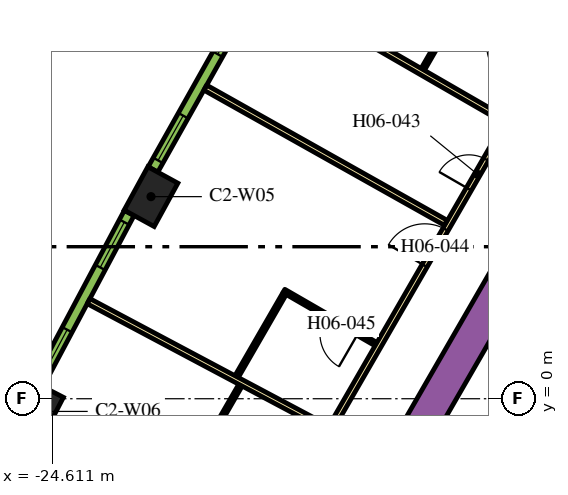
"""IFC4 building model, lengths in metres.
Left out: names, types, materials, properties, quantities, classifications, styles, units other than length and angle.
Written with IfcOpenShell. Run it as: python <this file> out.ifc"""

import sys

from ifc_helpers import new_model, si_unit, direction, frame, frame_2d, origin, origin_2d, place, context, subcontext, project, spatial, rectangle, extrude, element, fill, save


model = new_model("IFC4")
c1 = context("Model", 3, precision=1e-05, world=origin(), true_north=direction((0.0, 1.0)))
c2 = subcontext(c1, "Body", "Model", "MODEL_VIEW")
j1 = project(units=[si_unit("LENGTHUNIT", "METRE"), si_unit("PLANEANGLEUNIT", "RADIAN")], contexts=[c1])
p1 = place(None, origin())
s1 = spatial("IfcSite", under=j1, at=p1, CompositionType="ELEMENT")
p2 = place(p1, origin())
s2 = spatial("IfcBuilding", under=s1, at=p2, CompositionType="ELEMENT")
p3 = place(p2, frame((0.0, 0.0, 87.6)))
s3 = spatial("IfcBuildingStorey", under=s2, at=p3, CompositionType="ELEMENT", Elevation=87.6)
for number, where, z_axis, x_axis in (
    (1, (-22.009, 5.317, 0.0), (0.0, 0.0, 1.0), (-0.48, -0.877, 0.0)),
    (2, (-25.012, -0.334, 0.0), (0.0, 0.0, 1.0), (-0.459, -0.888, 0.0)),
):
    element("IfcColumn", number, at=place(p3, frame(where, z_axis=z_axis, x_axis=x_axis)), inside=s3, PredefinedType="COLUMN", context=c2, shape_type="SweptSolid", body=[
        extrude(rectangle(XDim=1.3, YDim=0.9, at=origin_2d()), origin(), (0.0, 0.0, 1.0), 3.9),
    ])
p4 = place(p3, frame((-15.36, -1.503, 0.0), z_axis=(0.0, 0.0, 1.0), x_axis=(0.50000389221, 0.866023156604, 0.0)))
e3 = element("IfcWall", 3, at=p4, inside=s3, PredefinedType="SOLIDWALL", context=c2, shape_type="SweptSolid", body=[
    extrude(rectangle(XDim=21.0, YDim=0.9, at=frame_2d((10.5, 0.0))), origin(), (0.0, 0.0, 1.0), 3.9),
])
p5 = place(p3, frame((-19.081, -3.9, 0.0), z_axis=(0.0, 0.0, 1.0), x_axis=(0.499998313975, 0.866026377209, 0.0)))
e4 = element("IfcWall", 4, at=p5, inside=s3, PredefinedType="PARTITIONING", context=c2, shape_type="SweptSolid", body=[
    extrude(rectangle(XDim=25.766, YDim=0.15, at=frame_2d((12.883, 0.0))), origin(), (0.0, 0.0, 1.0), 2.75),
])
p6 = place(p5, frame((19.306, 0.0, 0.0)))
e5 = element("IfcOpeningElement", 5, at=p6, cuts=e4, PredefinedType="OPENING", context=c2, shape_type="SweptSolid", body=[
    extrude(rectangle(XDim=1.0, YDim=2.1, at=frame_2d((0.5, 1.05))), frame((0.0, 0.085, 0.0), z_axis=(0.0, -1.0, 0.0), x_axis=(1.0, 0.0, 0.0)), (0.0, 0.0, 1.0), 0.17),
])
p7 = place(p5, frame((18.0, 0.0, 0.0)))
e6 = element("IfcOpeningElement", 6, at=p7, cuts=e4, PredefinedType="OPENING", context=c2, shape_type="SweptSolid", body=[
    extrude(rectangle(XDim=1.0, YDim=2.1, at=frame_2d((0.5, 1.05))), frame((0.0, 0.085, 0.0), z_axis=(0.0, -1.0, 0.0), x_axis=(1.0, 0.0, 0.0)), (0.0, 0.0, 1.0), 0.17),
])
p8 = place(p5, frame((10.874, 0.0, 0.0)))
e7 = element("IfcOpeningElement", 7, at=p8, cuts=e4, PredefinedType="OPENING", context=c2, shape_type="SweptSolid", body=[
    extrude(rectangle(XDim=0.9, YDim=2.1, at=frame_2d((0.45, 1.05))), frame((0.0, 0.085, 0.0), z_axis=(0.0, -1.0, 0.0), x_axis=(1.0, 0.0, 0.0)), (0.0, 0.0, 1.0), 0.17),
])
p9 = place(p5, frame((8.548, 0.0, 0.0)))
e8 = element("IfcOpeningElement", 8, at=p9, cuts=e4, PredefinedType="OPENING", context=c2, shape_type="SweptSolid", body=[
    extrude(rectangle(XDim=1.1, YDim=2.1, at=frame_2d((0.55, 1.05))), frame((0.0, 0.085, 0.0), z_axis=(0.0, -1.0, 0.0), x_axis=(1.0, 0.0, 0.0)), (0.0, 0.0, 1.0), 0.17),
])
p10 = place(p5, frame((0.18, 0.0, 0.0)))
e9 = element("IfcOpeningElement", 9, at=p10, cuts=e4, PredefinedType="OPENING", context=c2, shape_type="SweptSolid", body=[
    extrude(rectangle(XDim=1.0, YDim=2.1, at=frame_2d((0.5, 1.05))), frame((0.0, 0.085, 0.0), z_axis=(0.0, -1.0, 0.0), x_axis=(1.0, 0.0, 0.0)), (0.0, 0.0, 1.0), 0.17),
])
p11 = place(p3, frame((-23.652, 2.567, 0.0), z_axis=(0.0, 0.0, 1.0), x_axis=(0.883019237957, -0.469336793144, 0.0)))
e10 = element("IfcWall", 10, at=p11, inside=s3, PredefinedType="PARTITIONING", context=c2, shape_type="SweptSolid", body=[
    extrude(rectangle(XDim=7.111, YDim=0.15, at=frame_2d((3.555, 0.0))), origin(), (0.0, 0.0, 1.0), 2.75),
])
p12 = place(p3, frame((-20.581, 8.185, 0.0), z_axis=(0.0, 0.0, 1.0), x_axis=(0.871820720803, -0.489825102233, 0.0)))
e11 = element("IfcWall", 11, at=p12, inside=s3, PredefinedType="PARTITIONING", context=c2, shape_type="SweptSolid", body=[
    extrude(rectangle(XDim=7.257, YDim=0.15, at=frame_2d((3.628, 0.0))), origin(), (0.0, 0.0, 1.0), 2.75),
])
p13 = place(p3, frame((-18.484, 10.672, 0.0), z_axis=(0.0, 0.0, 1.0), x_axis=(0.866019162053, -0.50001081084, 0.0)))
e12 = element("IfcWall", 12, at=p13, inside=s3, PredefinedType="PARTITIONING", context=c2, shape_type="SweptSolid", body=[
    extrude(rectangle(XDim=6.694, YDim=0.15, at=frame_2d((3.347, 0.0))), origin(), (0.0, 0.0, 1.0), 2.75),
])
p14 = place(p3, frame((-11.75, 8.949, 0.0), z_axis=(0.0, 0.0, 1.0), x_axis=(-0.865997922154, 0.500047596559, 0.0)))
e13 = element("IfcWall", 13, at=p14, inside=s3, PredefinedType="PARTITIONING", context=c2, shape_type="SweptSolid", body=[
    extrude(rectangle(XDim=2.6, YDim=0.1, at=frame_2d((1.3, 0.0))), origin(), (0.0, 0.0, 1.0), 2.75),
])
p15 = place(p14, frame((0.6, 0.0, 0.0)))
e14 = element("IfcOpeningElement", 14, at=p15, cuts=e13, PredefinedType="OPENING", context=c2, shape_type="SweptSolid", body=[
    extrude(rectangle(XDim=0.9, YDim=2.1, at=frame_2d((0.45, 1.05))), frame((0.0, 0.06, 0.0), z_axis=(0.0, -1.0, 0.0), x_axis=(1.0, 0.0, 0.0)), (0.0, 0.0, 1.0), 0.12),
])
p16 = place(p3, frame((-13.983, 10.181, 0.0), z_axis=(0.0, 0.0, 1.0), x_axis=(-0.499980071345, -0.866036909293, 0.0)))
e15 = element("IfcWall", 15, at=p16, inside=s3, PredefinedType="PARTITIONING", context=c2, shape_type="SweptSolid", body=[
    extrude(rectangle(XDim=1.75, YDim=0.1, at=frame_2d((0.875, 0.0))), origin(), (0.0, 0.0, 1.0), 2.75),
])
p17 = place(p3, frame((-16.087, 1.436, 0.0), z_axis=(0.0, 0.0, 1.0), x_axis=(-0.866034573852, 0.49998411664, 0.0)))
e16 = element("IfcWall", 16, at=p17, inside=s3, PredefinedType="PARTITIONING", context=c2, shape_type="SweptSolid", body=[
    extrude(rectangle(XDim=2.8, YDim=0.1, at=frame_2d((1.4, 0.0))), origin(), (0.0, 0.0, 1.0), 2.75),
])
p18 = place(p17, frame((0.55, 0.0, 0.0)))
e17 = element("IfcOpeningElement", 17, at=p18, cuts=e16, PredefinedType="OPENING", context=c2, shape_type="SweptSolid", body=[
    extrude(rectangle(XDim=1.0, YDim=2.1, at=frame_2d((0.5, 1.05))), frame((0.0, 0.06, 0.0), z_axis=(0.0, -1.0, 0.0), x_axis=(1.0, 0.0, 0.0)), (0.0, 0.0, 1.0), 0.12),
])
p19 = place(p3, frame((-18.494, 2.768, 0.0), z_axis=(0.0, 0.0, 1.0), x_axis=(-0.500004791531, -0.866022637375, 0.0)))
e18 = element("IfcWall", 18, at=p19, inside=s3, PredefinedType="PARTITIONING", context=c2, shape_type="SweptSolid", body=[
    extrude(rectangle(XDim=2.52, YDim=0.1, at=frame_2d((1.26, 0.0))), origin(), (0.0, 0.0, 1.0), 2.75),
])
p20 = place(p3, frame((-20.449, -1.019, 0.0), z_axis=(0.0, 0.0, 1.0), x_axis=(0.500061319399, 0.865989998118, 0.0)))
e19 = element("IfcWall", 19, at=p20, inside=s3, PredefinedType="PARTITIONING", context=c2, shape_type="SweptSolid", body=[
    extrude(rectangle(XDim=1.58, YDim=0.1, at=frame_2d((0.79, 0.0))), origin(), (0.0, 0.0, 1.0), 2.75),
])
p21 = place(p3, frame((-19.458, 10.48, 0.0), z_axis=(0.0, 0.0, 1.0), x_axis=(-0.48983164787, -0.87181704316, 0.0)))
e20 = element("IfcWall", 20, at=p21, inside=s3, PredefinedType="SOLIDWALL", context=c2, shape_type="SweptSolid", body=[
    extrude(rectangle(XDim=5.1, YDim=0.29, at=frame_2d((2.55, 0.0))), origin(), (0.0, 0.0, 1.0), 3.65),
])
p22 = place(p21, frame((0.272, 0.0, 0.9)))
e21 = element("IfcOpeningElement", 21, at=p22, cuts=e20, PredefinedType="OPENING", context=c2, shape_type="SweptSolid", body=[
    extrude(rectangle(XDim=1.35, YDim=2.15, at=frame_2d((0.675, 1.075))), frame((0.0, 0.155, 0.0), z_axis=(0.0, -1.0, 0.0), x_axis=(1.0, 0.0, 0.0)), (0.0, 0.0, 1.0), 0.31),
])
p23 = place(p21, frame((3.478, 0.0, 0.9)))
e22 = element("IfcOpeningElement", 22, at=p23, cuts=e20, PredefinedType="OPENING", context=c2, shape_type="SweptSolid", body=[
    extrude(rectangle(XDim=1.35, YDim=2.15, at=frame_2d((0.675, 1.075))), frame((0.0, 0.155, 0.0), z_axis=(0.0, -1.0, 0.0), x_axis=(1.0, 0.0, 0.0)), (0.0, 0.0, 1.0), 0.31),
])
p24 = place(p3, frame((-22.583, 4.887, 0.0), z_axis=(0.0, 0.0, 1.0), x_axis=(-0.469323203119, -0.883026461106, 0.0)))
e23 = element("IfcWall", 23, at=p24, inside=s3, PredefinedType="SOLIDWALL", context=c2, shape_type="SweptSolid", body=[
    extrude(rectangle(XDim=5.101, YDim=0.29, at=frame_2d((2.55, 0.0))), origin(), (0.0, 0.0, 1.0), 3.65),
])
p25 = place(p24, frame((0.273, 0.0, 0.9)))
e24 = element("IfcOpeningElement", 24, at=p25, cuts=e23, PredefinedType="OPENING", context=c2, shape_type="SweptSolid", body=[
    extrude(rectangle(XDim=1.35, YDim=2.15, at=frame_2d((0.675, 1.075))), frame((0.0, 0.155, 0.0), z_axis=(0.0, -1.0, 0.0), x_axis=(1.0, 0.0, 0.0)), (0.0, 0.0, 1.0), 0.31),
])
p26 = place(p24, frame((3.478, 0.0, 0.9)))
e25 = element("IfcOpeningElement", 25, at=p26, cuts=e23, PredefinedType="OPENING", context=c2, shape_type="SweptSolid", body=[
    extrude(rectangle(XDim=1.35, YDim=2.15, at=frame_2d((0.675, 1.075))), frame((0.0, 0.155, 0.0), z_axis=(0.0, -1.0, 0.0), x_axis=(1.0, 0.0, 0.0)), (0.0, 0.0, 1.0), 0.31),
])
p27 = place(p8, origin())
e26 = element("IfcDoor", 26, at=p27, inside=s3, OperationType="SINGLE_SWING_LEFT", PredefinedType="DOOR", context=c2, shape_type="SweptSolid", body=[
    extrude(rectangle(XDim=0.9, YDim=2.1, at=frame_2d((0.45, 1.05))), frame((0.0, 0.025, 0.0), z_axis=(0.0, -1.0, 0.0), x_axis=(1.0, 0.0, 0.0)), (0.0, 0.0, 1.0), 0.05),
])
fill(e7, e26)
p28 = place(p9, origin())
e27 = element("IfcDoor", 27, at=p28, inside=s3, OperationType="SINGLE_SWING_RIGHT", PredefinedType="DOOR", context=c2, shape_type="SweptSolid", body=[
    extrude(rectangle(XDim=1.1, YDim=2.1, at=frame_2d((0.55, 1.05))), frame((0.0, 0.025, 0.0), z_axis=(0.0, -1.0, 0.0), x_axis=(1.0, 0.0, 0.0)), (0.0, 0.0, 1.0), 0.05),
])
fill(e8, e27)
p29 = place(p18, origin())
e28 = element("IfcDoor", 28, at=p29, inside=s3, OperationType="SINGLE_SWING_RIGHT", PredefinedType="DOOR", context=c2, shape_type="SweptSolid", body=[
    extrude(rectangle(XDim=1.0, YDim=2.1, at=frame_2d((0.5, 1.05))), frame((0.0, 0.025, 0.0), z_axis=(0.0, -1.0, 0.0), x_axis=(1.0, 0.0, 0.0)), (0.0, 0.0, 1.0), 0.05),
])
fill(e17, e28)
p30 = place(p22, origin())
e29 = element("IfcWindow", 29, at=p30, inside=s3, PartitioningType="DOUBLE_PANEL_VERTICAL", PredefinedType="WINDOW", context=c2, shape_type="SweptSolid", body=[
    extrude(rectangle(XDim=1.35, YDim=2.15, at=frame_2d((0.675, 1.075))), frame((0.0, 0.015, 0.0), z_axis=(0.0, -1.0, 0.0), x_axis=(1.0, 0.0, 0.0)), (0.0, 0.0, 1.0), 0.06),
])
fill(e21, e29)
p31 = place(p23, origin())
e30 = element("IfcWindow", 30, at=p31, inside=s3, PartitioningType="DOUBLE_PANEL_VERTICAL", PredefinedType="WINDOW", context=c2, shape_type="SweptSolid", body=[
    extrude(rectangle(XDim=1.35, YDim=2.15, at=frame_2d((0.675, 1.075))), frame((0.0, 0.015, 0.0), z_axis=(0.0, -1.0, 0.0), x_axis=(1.0, 0.0, 0.0)), (0.0, 0.0, 1.0), 0.06),
])
fill(e22, e30)
p32 = place(p25, origin())
e31 = element("IfcWindow", 31, at=p32, inside=s3, PartitioningType="DOUBLE_PANEL_VERTICAL", PredefinedType="WINDOW", context=c2, shape_type="SweptSolid", body=[
    extrude(rectangle(XDim=1.35, YDim=2.15, at=frame_2d((0.675, 1.075))), frame((0.0, 0.015, 0.0), z_axis=(0.0, -1.0, 0.0), x_axis=(1.0, 0.0, 0.0)), (0.0, 0.0, 1.0), 0.06),
])
fill(e24, e31)
p33 = place(p26, origin())
e32 = element("IfcWindow", 32, at=p33, inside=s3, PartitioningType="DOUBLE_PANEL_VERTICAL", PredefinedType="WINDOW", context=c2, shape_type="SweptSolid", body=[
    extrude(rectangle(XDim=1.35, YDim=2.15, at=frame_2d((0.675, 1.075))), frame((0.0, 0.015, 0.0), z_axis=(0.0, -1.0, 0.0), x_axis=(1.0, 0.0, 0.0)), (0.0, 0.0, 1.0), 0.06),
])
fill(e25, e32)
save(model, sys.argv[1])
